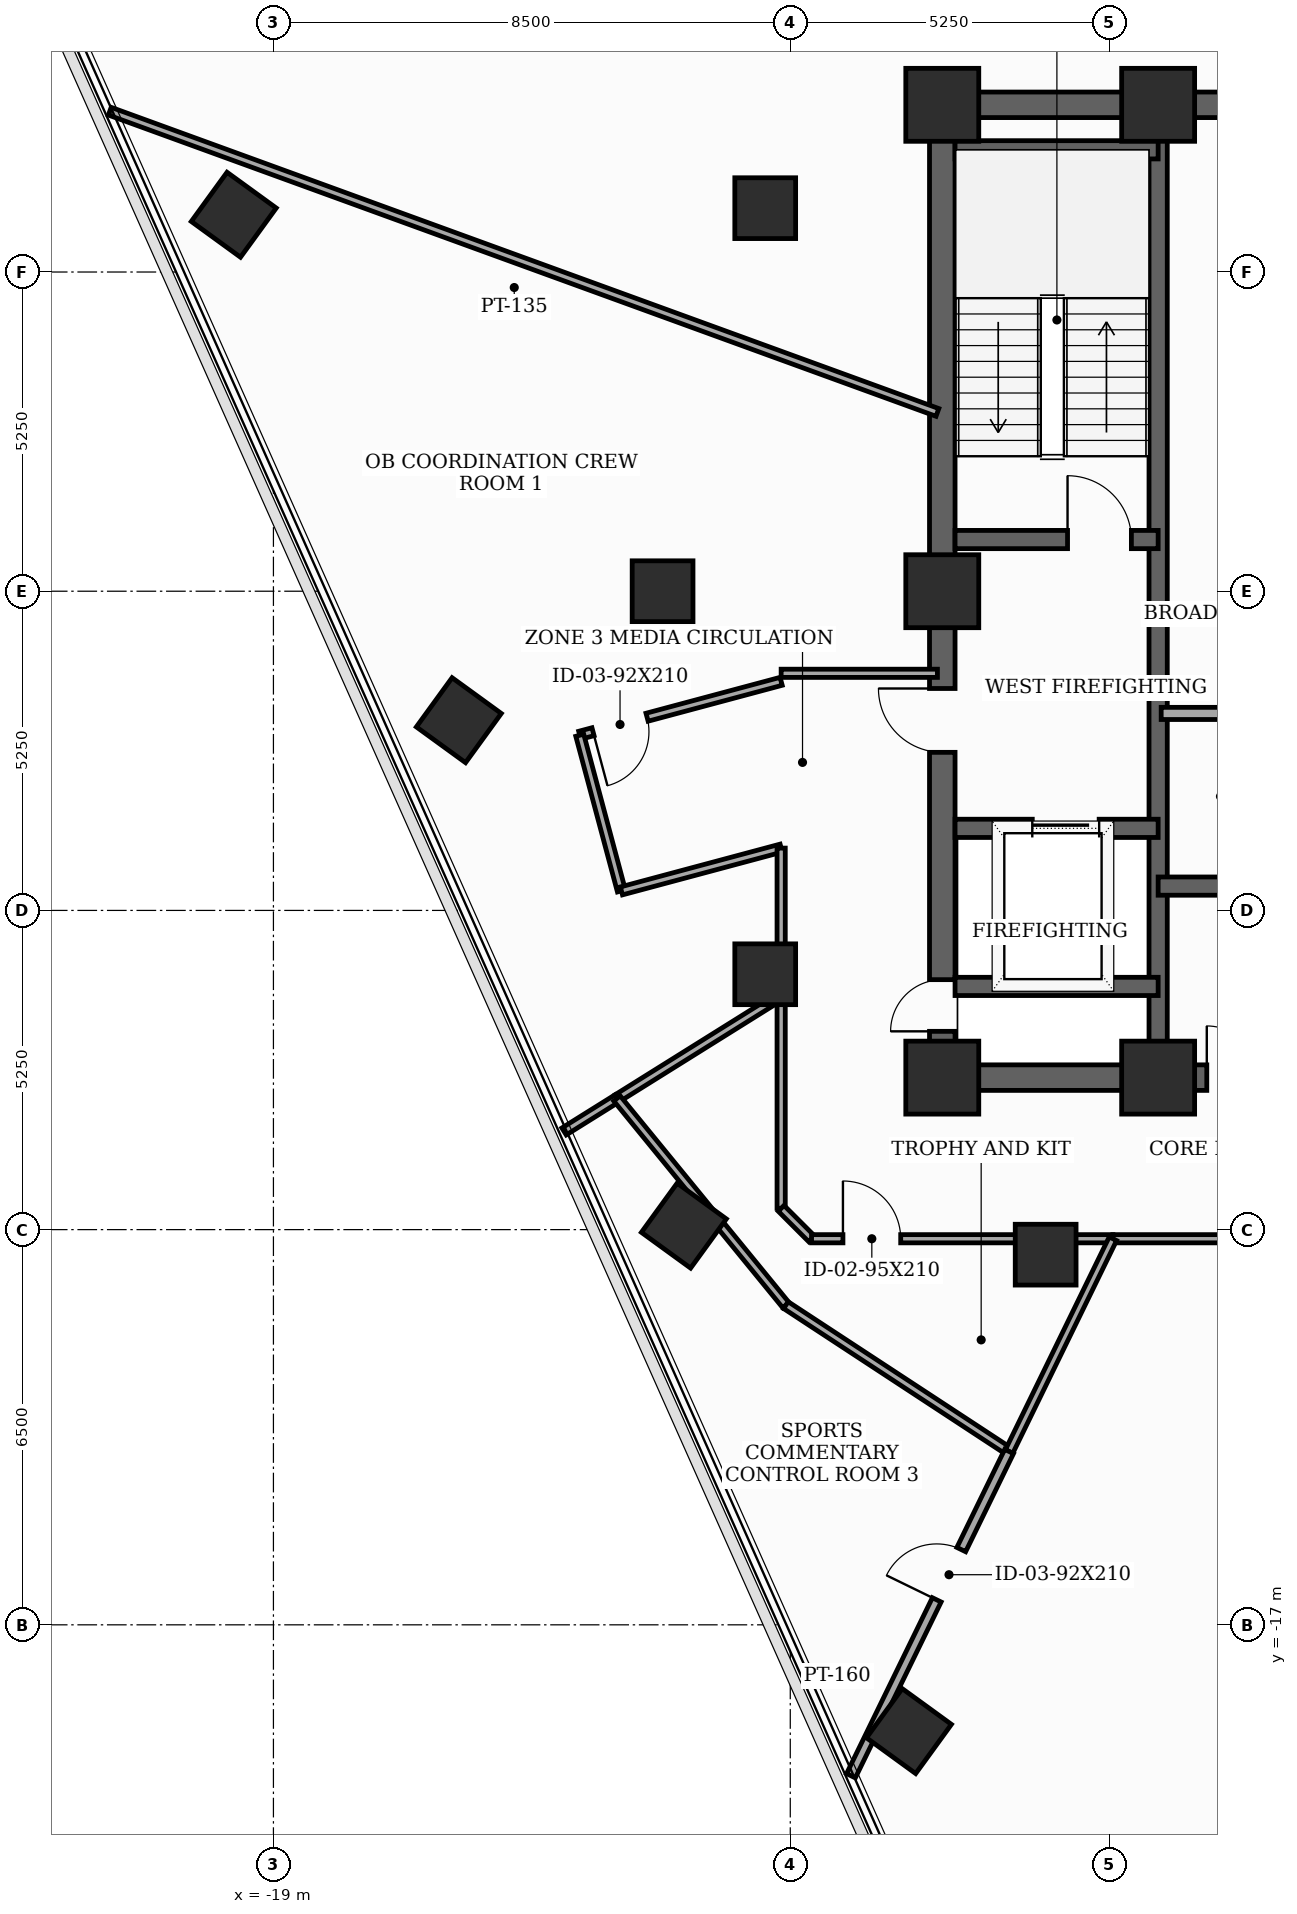
"""IFC4 building model, lengths in metres.
Left out: names, types, materials, properties, quantities, classifications, styles, units other than length and angle.
Written with IfcOpenShell. Run it as: python <this file> out.ifc"""

import sys

from ifc_helpers import new_model, si_unit, direction, frame, frame_2d, origin, origin_2d, place, context, subcontext, project, spatial, rectangle, extrude, element, fill, save


model = new_model("IFC4")
c1 = context("Model", 3, precision=1e-05, world=origin(), true_north=direction((0.0, 1.0)))
c2 = subcontext(c1, "Body", "Model", "MODEL_VIEW")
j1 = project(units=[si_unit("LENGTHUNIT", "METRE"), si_unit("PLANEANGLEUNIT", "RADIAN")], contexts=[c1])
p1 = place(None, origin())
s1 = spatial("IfcSite", under=j1, at=p1, CompositionType="ELEMENT")
p2 = place(p1, origin())
s2 = spatial("IfcBuilding", under=s1, at=p2, CompositionType="ELEMENT")
p3 = place(p2, frame((0.0, 0.0, 241.1)))
s3 = spatial("IfcBuildingStorey", under=s2, at=p3, CompositionType="ELEMENT", Elevation=241.1)
for number, where, z_axis, x_axis in (
    (1, (-8.0, -8.0, 0.0), (0.0, 0.0, 1.0), (1.0, 0.0, 0.0)),
    (2, (-4.45, -8.0, 0.0), (0.0, 0.0, 1.0), (1.0, 0.0, 0.0)),
    (3, (-4.45, 8.0, 0.0), (0.0, 0.0, 1.0), (1.0, 0.0, 0.0)),
    (4, (-8.0, 8.0, 0.0), (0.0, 0.0, 1.0), (1.0, 0.0, 0.0)),
    (5, (-8.0, 0.0, 0.0), (0.0, 0.0, 1.0), (1.0, 0.0, 0.0)),
):
    element("IfcColumn", number, at=place(p3, frame(where, z_axis=z_axis, x_axis=x_axis)), inside=s3, PredefinedType="COLUMN", context=c2, shape_type="SweptSolid", body=[
        extrude(rectangle(XDim=1.2, YDim=1.2, at=origin_2d()), origin(), (0.0, 0.0, 1.0), 3.7),
    ])
for number, where, z_axis, x_axis in (
    (6, (-10.912, 6.3, 0.0), (0.0, 0.0, 1.0), (1.0, 0.0, 0.0)),
    (7, (-12.6, 0.0, 0.0), (0.0, 0.0, 1.0), (1.0, 0.0, 0.0)),
    (8, (-10.912, -6.3, 0.0), (0.0, 0.0, 1.0), (1.0, 0.0, 0.0)),
    (9, (-6.3, -10.912, 0.0), (0.0, 0.0, 1.0), (1.0, 0.0, 0.0)),
    (10, (-19.652, 6.192, 0.0), (0.0, 0.0, 1.0), (0.588, 0.809, 0.0)),
    (11, (-15.951, -2.121, 0.0), (0.0, 0.0, 1.0), (0.588, 0.809, 0.0)),
    (12, (-12.25, -10.435, 0.0), (0.0, 0.0, 1.0), (0.588, 0.809, 0.0)),
    (13, (-8.548, -18.748, 0.0), (0.0, 0.0, 1.0), (0.588, 0.809, 0.0)),
):
    element("IfcColumn", number, at=place(p3, frame(where, z_axis=z_axis, x_axis=x_axis)), inside=s3, PredefinedType="COLUMN", context=c2, shape_type="SweptSolid", body=[
        extrude(rectangle(XDim=1.0, YDim=1.0, at=origin_2d()), origin(), (0.0, 0.0, 1.0), 3.7),
    ])
p4 = place(p3, frame((-8.0, -8.0, 0.0), z_axis=(0.0, 0.0, 1.0), x_axis=(0.0, 1.0, 0.0)))
e14 = element("IfcWall", 14, at=p4, inside=s3, PredefinedType="SHEAR", context=c2, shape_type="SweptSolid", body=[
    extrude(rectangle(XDim=16.0, YDim=0.42, at=frame_2d((8.0, 0.0))), origin(), (0.0, 0.0, 1.0), 3.5),
])
p5 = place(p4, frame((0.761, 0.0, 0.0)))
e15 = element("IfcOpeningElement", 15, at=p5, cuts=e14, PredefinedType="OPENING", context=c2, shape_type="SweptSolid", body=[
    extrude(rectangle(XDim=0.85, YDim=2.02, at=frame_2d((0.425, 1.01))), frame((0.0, 0.22, 0.0), z_axis=(0.0, -1.0, 0.0), x_axis=(1.0, 0.0, 0.0)), (0.0, 0.0, 1.0), 0.44),
])
p6 = place(p4, frame((5.35, 0.0, 0.0)))
e16 = element("IfcOpeningElement", 16, at=p6, cuts=e14, PredefinedType="OPENING", context=c2, shape_type="SweptSolid", body=[
    extrude(rectangle(XDim=1.05, YDim=2.15, at=frame_2d((0.525, 1.075))), frame((0.0, 0.22, 0.0), z_axis=(0.0, -1.0, 0.0), x_axis=(1.0, 0.0, 0.0)), (0.0, 0.0, 1.0), 0.44),
])
p7 = place(p3, frame((-8.0, -8.0, 0.0), z_axis=(0.0, 0.0, 1.0), x_axis=(1.0, 0.0, 0.0)))
e17 = element("IfcWall", 17, at=p7, inside=s3, PredefinedType="SHEAR", context=c2, shape_type="SweptSolid", body=[
    extrude(rectangle(XDim=16.0, YDim=0.42, at=frame_2d((8.0, 0.0))), origin(), (0.0, 0.0, 1.0), 3.5),
])
p8 = place(p7, frame((4.35, 0.0, 0.0)))
e18 = element("IfcOpeningElement", 18, at=p8, cuts=e17, PredefinedType="OPENING", context=c2, shape_type="SweptSolid", body=[
    extrude(rectangle(XDim=0.85, YDim=2.02, at=frame_2d((0.425, 1.01))), frame((0.0, 0.22, 0.0), z_axis=(0.0, -1.0, 0.0), x_axis=(1.0, 0.0, 0.0)), (0.0, 0.0, 1.0), 0.44),
])
p9 = place(p7, frame((6.49, 0.0, 0.0)))
e19 = element("IfcOpeningElement", 19, at=p9, cuts=e17, PredefinedType="OPENING", context=c2, shape_type="SweptSolid", body=[
    extrude(rectangle(XDim=0.85, YDim=2.02, at=frame_2d((0.425, 1.01))), frame((0.0, 0.22, 0.0), z_axis=(0.0, -1.0, 0.0), x_axis=(1.0, 0.0, 0.0)), (0.0, 0.0, 1.0), 0.44),
])
p10 = place(p7, frame((8.69, 0.0, 0.0)))
e20 = element("IfcOpeningElement", 20, at=p10, cuts=e17, PredefinedType="OPENING", context=c2, shape_type="SweptSolid", body=[
    extrude(rectangle(XDim=0.85, YDim=2.02, at=frame_2d((0.425, 1.01))), frame((0.0, 0.22, 0.0), z_axis=(0.0, -1.0, 0.0), x_axis=(1.0, 0.0, 0.0)), (0.0, 0.0, 1.0), 0.44),
])
p11 = place(p7, frame((10.8, 0.0, 0.0)))
e21 = element("IfcOpeningElement", 21, at=p11, cuts=e17, PredefinedType="OPENING", context=c2, shape_type="SweptSolid", body=[
    extrude(rectangle(XDim=0.85, YDim=2.02, at=frame_2d((0.425, 1.01))), frame((0.0, 0.22, 0.0), z_axis=(0.0, -1.0, 0.0), x_axis=(1.0, 0.0, 0.0)), (0.0, 0.0, 1.0), 0.44),
])
p12 = place(p3, frame((-8.0, 8.0, 0.0), z_axis=(0.0, 0.0, 1.0), x_axis=(1.0, 0.0, 0.0)))
e22 = element("IfcWall", 22, at=p12, inside=s3, PredefinedType="SHEAR", context=c2, shape_type="SweptSolid", body=[
    extrude(rectangle(XDim=16.0, YDim=0.42, at=frame_2d((8.0, 0.0))), origin(), (0.0, 0.0, 1.0), 3.5),
])
p13 = place(p12, frame((7.1, 0.0, 0.0)))
e23 = element("IfcOpeningElement", 23, at=p13, cuts=e22, PredefinedType="OPENING", context=c2, shape_type="SweptSolid", body=[
    extrude(rectangle(XDim=1.8, YDim=2.15, at=frame_2d((0.9, 1.075))), frame((0.0, 0.22, 0.0), z_axis=(0.0, -1.0, 0.0), x_axis=(1.0, 0.0, 0.0)), (0.0, 0.0, 1.0), 0.44),
])
p14 = place(p3, frame((-4.45, -7.79, 0.0), z_axis=(0.0, 0.0, 1.0), x_axis=(0.0, 1.0, 0.0)))
e24 = element("IfcWall", 24, at=p14, inside=s3, PredefinedType="SHEAR", context=c2, shape_type="SweptSolid", body=[
    extrude(rectangle(XDim=15.58, YDim=0.3, at=frame_2d((7.79, 0.0))), origin(), (0.0, 0.0, 1.0), 3.5),
])
p15 = place(p3, frame((-7.79, 0.85, 0.0), z_axis=(0.0, 0.0, 1.0), x_axis=(1.0, 0.0, 0.0)))
e25 = element("IfcWall", 25, at=p15, inside=s3, PredefinedType="SHEAR", context=c2, shape_type="SweptSolid", body=[
    extrude(rectangle(XDim=3.34, YDim=0.3, at=frame_2d((1.67, 0.0))), origin(), (0.0, 0.0, 1.0), 3.5),
])
p16 = place(p15, frame((1.85, 0.0, 0.0)))
e26 = element("IfcOpeningElement", 26, at=p16, cuts=e25, PredefinedType="OPENING", context=c2, shape_type="SweptSolid", body=[
    extrude(rectangle(XDim=1.05, YDim=2.15, at=frame_2d((0.525, 1.075))), frame((0.0, 0.16, 0.0), z_axis=(0.0, -1.0, 0.0), x_axis=(1.0, 0.0, 0.0)), (0.0, 0.0, 1.0), 0.32),
])
p17 = place(p3, frame((-7.79, 7.26, 0.0), z_axis=(0.0, 0.0, 1.0), x_axis=(1.0, 0.0, 0.0)))
e27 = element("IfcWall", 27, at=p17, inside=s3, PredefinedType="SHEAR", context=c2, shape_type="SweptSolid", body=[
    extrude(rectangle(XDim=3.34, YDim=0.3, at=frame_2d((1.67, 0.0))), origin(), (0.0, 0.0, 1.0), 3.5),
])
p18 = place(p3, frame((-7.79, -3.9, 0.0), z_axis=(0.0, 0.0, 1.0), x_axis=(1.0, 0.0, 0.0)))
e28 = element("IfcWall", 28, at=p18, inside=s3, PredefinedType="SHEAR", context=c2, shape_type="SweptSolid", body=[
    extrude(rectangle(XDim=3.34, YDim=0.3, at=frame_2d((1.67, 0.0))), origin(), (0.0, 0.0, 1.0), 3.5),
])
p19 = place(p18, frame((1.27, 0.0, 0.0)))
e29 = element("IfcOpeningElement", 29, at=p19, cuts=e28, PredefinedType="OPENING", context=c2, shape_type="SweptSolid", body=[
    extrude(rectangle(XDim=1.1, YDim=2.1, at=frame_2d((0.55, 1.05))), frame((0.0, 0.16, 0.0), z_axis=(0.0, -1.0, 0.0), x_axis=(1.0, 0.0, 0.0)), (0.0, 0.0, 1.0), 0.32),
])
p20 = place(p3, frame((-7.79, -6.5, 0.0), z_axis=(0.0, 0.0, 1.0), x_axis=(1.0, 0.0, 0.0)))
e30 = element("IfcWall", 30, at=p20, inside=s3, PredefinedType="SHEAR", context=c2, shape_type="SweptSolid", body=[
    extrude(rectangle(XDim=3.34, YDim=0.3, at=frame_2d((1.67, 0.0))), origin(), (0.0, 0.0, 1.0), 3.5),
])
p21 = place(p3, frame((-4.45, -4.85, 0.0), z_axis=(0.0, 0.0, 1.0), x_axis=(1.0, 0.0, 0.0)))
e31 = element("IfcWall", 31, at=p21, inside=s3, PredefinedType="SHEAR", context=c2, shape_type="SweptSolid", body=[
    extrude(rectangle(XDim=8.9, YDim=0.3, at=frame_2d((4.45, 0.0))), origin(), (0.0, 0.0, 1.0), 3.5),
])
p22 = place(p3, frame((-4.4, -2.01, 0.0), z_axis=(0.0, 0.0, 1.0), x_axis=(1.0, 0.0, 0.0)))
e32 = element("IfcWall", 32, at=p22, inside=s3, PredefinedType="SOLIDWALL", context=c2, shape_type="SweptSolid", body=[
    extrude(rectangle(XDim=2.68, YDim=0.2, at=frame_2d((1.34, 0.0))), origin(), (0.0, 0.0, 1.0), 3.5),
])
p23 = place(p3, frame((-8.08, -1.35, 0.0), z_axis=(0.0, 0.0, 1.0), x_axis=(-1.0, 0.0, 0.0)))
e33 = element("IfcWall", 33, at=p23, inside=s3, PredefinedType="PARTITIONING", context=c2, shape_type="SweptSolid", body=[
    extrude(rectangle(XDim=2.57, YDim=0.135, at=frame_2d((1.285, 0.0))), origin(), (0.0, 0.0, 1.0), 2.885),
])
p24 = place(p3, frame((-10.65, -1.482, 0.0), z_axis=(0.0, 0.0, 1.0), x_axis=(-0.965961397105, -0.2586862565, 0.0)))
e34 = element("IfcWall", 34, at=p24, inside=s3, PredefinedType="PARTITIONING", context=c2, shape_type="SweptSolid", body=[
    extrude(rectangle(XDim=3.429, YDim=0.135, at=frame_2d((1.714, 0.0))), origin(), (0.0, 0.0, 1.0), 2.885),
])
p25 = place(p24, frame((2.283, 0.0, 0.0)))
e35 = element("IfcOpeningElement", 35, at=p25, cuts=e34, PredefinedType="OPENING", context=c2, shape_type="SweptSolid", body=[
    extrude(rectangle(XDim=0.92, YDim=2.1, at=frame_2d((0.46, 1.05))), frame((0.0, 0.077, 0.0), z_axis=(0.0, -1.0, 0.0), x_axis=(1.0, 0.0, 0.0)), (0.0, 0.0, 1.0), 0.155),
])
p26 = place(p3, frame((-13.962, -2.369, 0.0), z_axis=(0.0, 0.0, 1.0), x_axis=(0.258413725385, -0.966034340245, 0.0)))
e36 = element("IfcWall", 36, at=p26, inside=s3, PredefinedType="PARTITIONING", context=c2, shape_type="SweptSolid", body=[
    extrude(rectangle(XDim=2.65, YDim=0.135, at=frame_2d((1.325, 0.0))), origin(), (0.0, 0.0, 1.0), 3.5),
])
p27 = place(p3, frame((-13.277, -4.929, 0.0), z_axis=(0.0, 0.0, 1.0), x_axis=(0.965934830229, 0.258785439601, 0.0)))
e37 = element("IfcWall", 37, at=p27, inside=s3, PredefinedType="PARTITIONING", context=c2, shape_type="SweptSolid", body=[
    extrude(rectangle(XDim=2.72, YDim=0.135, at=frame_2d((1.36, 0.0))), origin(), (0.0, 0.0, 1.0), 2.885),
])
p28 = place(p3, frame((-10.65, -4.225, 0.0), z_axis=(0.0, 0.0, 1.0), x_axis=(0.0, -1.0, 0.0)))
e38 = element("IfcWall", 38, at=p28, inside=s3, PredefinedType="PARTITIONING", context=c2, shape_type="SweptSolid", body=[
    extrude(rectangle(XDim=2.43, YDim=0.135, at=frame_2d((1.215, 0.0))), origin(), (0.0, 0.0, 1.0), 2.885),
])
p29 = place(p3, frame((-10.65, -6.655, 0.0), z_axis=(0.0, 0.0, 1.0), x_axis=(0.0, -1.0, 0.0)))
e39 = element("IfcWall", 39, at=p29, inside=s3, PredefinedType="PARTITIONING", context=c2, shape_type="SweptSolid", body=[
    extrude(rectangle(XDim=3.495, YDim=0.135, at=frame_2d((1.748, 0.0))), origin(), (0.0, 0.0, 1.0), 2.885),
])
p30 = place(p3, frame((-10.65, -10.15, 0.0), z_axis=(0.0, 0.0, 1.0), x_axis=(0.707106781187, -0.707106781187, 0.0)))
e40 = element("IfcWall", 40, at=p30, inside=s3, PredefinedType="PARTITIONING", context=c2, shape_type="SweptSolid", body=[
    extrude(rectangle(XDim=0.707, YDim=0.135, at=frame_2d((0.354, 0.0))), origin(), (0.0, 0.0, 1.0), 3.5),
])
p31 = place(p3, frame((-10.15, -10.65, 0.0), z_axis=(0.0, 0.0, 1.0), x_axis=(1.0, 0.0, 0.0)))
e41 = element("IfcWall", 41, at=p31, inside=s3, PredefinedType="PARTITIONING", context=c2, shape_type="SweptSolid", body=[
    extrude(rectangle(XDim=4.956, YDim=0.135, at=frame_2d((2.478, 0.0))), origin(), (0.0, 0.0, 1.0), 2.885),
])
p32 = place(p31, frame((0.516, 0.0, 0.0)))
e42 = element("IfcOpeningElement", 42, at=p32, cuts=e41, PredefinedType="OPENING", context=c2, shape_type="SweptSolid", body=[
    extrude(rectangle(XDim=0.95, YDim=2.1, at=frame_2d((0.475, 1.05))), frame((0.0, 0.077, 0.0), z_axis=(0.0, -1.0, 0.0), x_axis=(1.0, 0.0, 0.0)), (0.0, 0.0, 1.0), 0.155),
])
p33 = place(p3, frame((-5.194, -10.65, 0.0), z_axis=(0.0, 0.0, 1.0), x_axis=(1.0, 0.0, 0.0)))
e43 = element("IfcWall", 43, at=p33, inside=s3, PredefinedType="PARTITIONING", context=c2, shape_type="SweptSolid", body=[
    extrude(rectangle(XDim=13.515, YDim=0.135, at=frame_2d((6.758, 0.0))), origin(), (0.0, 0.0, 1.0), 2.885),
])
p34 = place(p33, frame((6.282, 0.0, 0.0)))
e44 = element("IfcOpeningElement", 44, at=p34, cuts=e43, PredefinedType="OPENING", context=c2, shape_type="SweptSolid", body=[
    extrude(rectangle(XDim=0.95, YDim=2.1, at=frame_2d((0.475, 1.05))), frame((0.0, 0.077, 0.0), z_axis=(0.0, -1.0, 0.0), x_axis=(1.0, 0.0, 0.0)), (0.0, 0.0, 1.0), 0.155),
])
p35 = place(p3, frame((-13.35, -8.342, 0.0), z_axis=(0.0, 0.0, 1.0), x_axis=(0.848084450475, 0.529861080721, 0.0)))
e45 = element("IfcWall", 45, at=p35, inside=s3, PredefinedType="PARTITIONING", context=c2, shape_type="SweptSolid", body=[
    extrude(rectangle(XDim=3.184, YDim=0.135, at=frame_2d((1.592, 0.0))), origin(), (0.0, 0.0, 1.0), 2.885),
])
p36 = place(p3, frame((-14.22, -8.885, 0.0), z_axis=(0.0, 0.0, 1.0), x_axis=(0.848265622385, 0.529570990406, 0.0)))
e46 = element("IfcWall", 46, at=p36, inside=s3, PredefinedType="PARTITIONING", context=c2, shape_type="SweptSolid", body=[
    extrude(rectangle(XDim=1.026, YDim=0.135, at=frame_2d((0.513, 0.0))), origin(), (0.0, 0.0, 1.0), 3.5),
])
p37 = place(p3, frame((-8.08, 2.941, 0.0), z_axis=(0.0, 0.0, 1.0), x_axis=(-0.939685602892, 0.342039424216, 0.0)))
e47 = element("IfcWall", 47, at=p37, inside=s3, PredefinedType="PARTITIONING", context=c2, shape_type="SweptSolid", body=[
    extrude(rectangle(XDim=14.485, YDim=0.135, at=frame_2d((7.242, 0.0))), origin(), (0.0, 0.0, 1.0), 2.885),
])
p38 = place(p3, frame((-13.35, -8.342, 0.0), z_axis=(0.0, 0.0, 1.0), x_axis=(0.63273803223, -0.774365922914, 0.0)))
e48 = element("IfcWall", 48, at=p38, inside=s3, PredefinedType="PARTITIONING", context=c2, shape_type="SweptSolid", body=[
    extrude(rectangle(XDim=4.391, YDim=0.135, at=frame_2d((2.195, 0.0))), origin(), (0.0, 0.0, 1.0), 2.985),
])
p39 = place(p3, frame((-10.572, -11.742, 0.0), z_axis=(0.0, 0.0, 1.0), x_axis=(0.836278230032, -0.548305318207, 0.0)))
e49 = element("IfcWall", 49, at=p39, inside=s3, PredefinedType="PARTITIONING", context=c2, shape_type="SweptSolid", body=[
    extrude(rectangle(XDim=4.39, YDim=0.135, at=frame_2d((2.195, 0.0))), origin(), (0.0, 0.0, 1.0), 2.985),
])
p40 = place(p3, frame((-6.901, -14.149, 0.0), z_axis=(0.0, 0.0, 1.0), x_axis=(0.438412512164, 0.89877386988, 0.0)))
e50 = element("IfcWall", 50, at=p40, inside=s3, PredefinedType="PARTITIONING", context=c2, shape_type="SweptSolid", body=[
    extrude(rectangle(XDim=3.893, YDim=0.135, at=frame_2d((1.947, 0.0))), origin(), (0.0, 0.0, 1.0), 2.885),
])
p41 = place(p3, frame((-9.502, -19.482, 0.0), z_axis=(0.0, 0.0, 1.0), x_axis=(0.438370943059, 0.898794145665, 0.0)))
e51 = element("IfcWall", 51, at=p41, inside=s3, PredefinedType="PARTITIONING", context=c2, shape_type="SweptSolid", body=[
    extrude(rectangle(XDim=5.934, YDim=0.16, at=frame_2d((2.967, 0.0))), origin(), (0.0, 0.0, 1.0), 2.985),
])
p42 = place(p41, frame((3.219, 0.0, 0.0)))
e52 = element("IfcOpeningElement", 52, at=p42, cuts=e51, PredefinedType="OPENING", context=c2, shape_type="SweptSolid", body=[
    extrude(rectangle(XDim=0.92, YDim=2.1, at=frame_2d((0.46, 1.05))), frame((0.0, 0.09, 0.0), z_axis=(0.0, -1.0, 0.0), x_axis=(1.0, 0.0, 0.0)), (0.0, 0.0, 1.0), 0.18),
])
p43 = place(p5, origin())
e53 = element("IfcDoor", 53, at=p43, inside=s3, OperationType="SINGLE_SWING_LEFT", PredefinedType="TRAPDOOR", context=c2, shape_type="SweptSolid", body=[
    extrude(rectangle(XDim=0.85, YDim=2.02, at=frame_2d((0.425, 1.01))), frame((0.0, 0.025, 0.0), z_axis=(0.0, -1.0, 0.0), x_axis=(1.0, 0.0, 0.0)), (0.0, 0.0, 1.0), 0.05),
])
fill(e15, e53)
p44 = place(p6, origin())
e54 = element("IfcDoor", 54, at=p44, inside=s3, OperationType="SINGLE_SWING_RIGHT", PredefinedType="DOOR", context=c2, shape_type="SweptSolid", body=[
    extrude(rectangle(XDim=1.05, YDim=2.15, at=frame_2d((0.525, 1.075))), frame((0.0, 0.025, 0.0), z_axis=(0.0, -1.0, 0.0), x_axis=(1.0, 0.0, 0.0)), (0.0, 0.0, 1.0), 0.05),
])
fill(e16, e54)
p45 = place(p8, origin())
e55 = element("IfcDoor", 55, at=p45, inside=s3, OperationType="SINGLE_SWING_LEFT", PredefinedType="TRAPDOOR", context=c2, shape_type="SweptSolid", body=[
    extrude(rectangle(XDim=0.85, YDim=2.02, at=frame_2d((0.425, 1.01))), frame((0.0, 0.025, 0.0), z_axis=(0.0, -1.0, 0.0), x_axis=(1.0, 0.0, 0.0)), (0.0, 0.0, 1.0), 0.05),
])
fill(e18, e55)
p46 = place(p16, origin())
e56 = element("IfcDoor", 56, at=p46, inside=s3, OperationType="SINGLE_SWING_LEFT", PredefinedType="DOOR", context=c2, shape_type="SweptSolid", body=[
    extrude(rectangle(XDim=1.05, YDim=2.15, at=frame_2d((0.525, 1.075))), frame((0.0, 0.025, 0.0), z_axis=(0.0, -1.0, 0.0), x_axis=(1.0, 0.0, 0.0)), (0.0, 0.0, 1.0), 0.05),
])
fill(e26, e56)
p47 = place(p19, origin())
e57 = element("IfcDoor", 57, at=p47, inside=s3, OperationType="SLIDING_TO_LEFT", PredefinedType="DOOR", context=c2, shape_type="SweptSolid", body=[
    extrude(rectangle(XDim=1.1, YDim=2.1, at=frame_2d((0.55, 1.05))), frame((0.0, 0.025, 0.0), z_axis=(0.0, -1.0, 0.0), x_axis=(1.0, 0.0, 0.0)), (0.0, 0.0, 1.0), 0.05),
])
fill(e29, e57)
p48 = place(p25, origin())
e58 = element("IfcDoor", 58, at=p48, inside=s3, OperationType="SINGLE_SWING_RIGHT", PredefinedType="DOOR", context=c2, shape_type="SweptSolid", body=[
    extrude(rectangle(XDim=0.92, YDim=2.1, at=frame_2d((0.46, 1.05))), frame((0.0, 0.025, 0.0), z_axis=(0.0, -1.0, 0.0), x_axis=(1.0, 0.0, 0.0)), (0.0, 0.0, 1.0), 0.05),
])
fill(e35, e58)
p49 = place(p32, origin())
e59 = element("IfcDoor", 59, at=p49, inside=s3, OperationType="SINGLE_SWING_LEFT", PredefinedType="DOOR", context=c2, shape_type="SweptSolid", body=[
    extrude(rectangle(XDim=0.95, YDim=2.1, at=frame_2d((0.475, 1.05))), frame((0.0, 0.025, 0.0), z_axis=(0.0, -1.0, 0.0), x_axis=(1.0, 0.0, 0.0)), (0.0, 0.0, 1.0), 0.05),
])
fill(e42, e59)
p50 = place(p42, origin())
e60 = element("IfcDoor", 60, at=p50, inside=s3, OperationType="SINGLE_SWING_LEFT", PredefinedType="DOOR", context=c2, shape_type="SweptSolid", body=[
    extrude(rectangle(XDim=0.92, YDim=2.1, at=frame_2d((0.46, 1.05))), frame((0.0, 0.025, 0.0), z_axis=(0.0, -1.0, 0.0), x_axis=(1.0, 0.0, 0.0)), (0.0, 0.0, 1.0), 0.05),
])
fill(e52, e60)
save(model, sys.argv[1])
